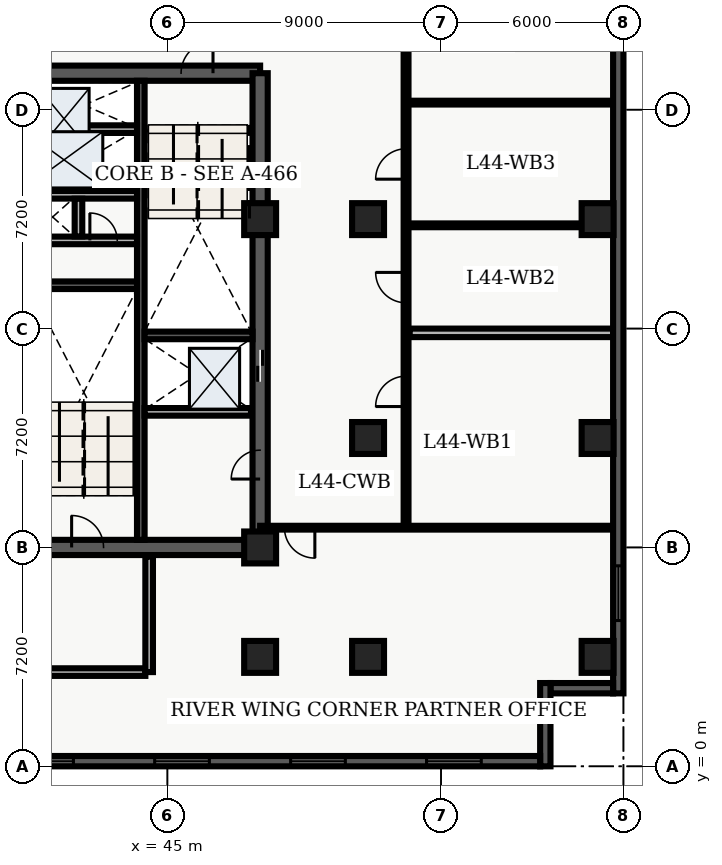
"""IFC4 building model, lengths in metres.
Left out: names, types, materials, properties, quantities, classifications, styles, units other than length and angle.
Written with IfcOpenShell. Run it as: python <this file> out.ifc"""

import sys

from ifc_helpers import new_model, entity, si_unit, converted_unit, direction, frame, origin_with_axes, origin_2d_with_axis, place, context, subcontext, project, spatial, polyline, rectangle, outline, extrude, element, fill, save


model = new_model("IFC4")
c1 = context("Model", 3, precision=1e-05, world=origin_with_axes(), true_north=direction((0.0, 1.0)))
c2 = subcontext(c1, "Body", "Model", "MODEL_VIEW")
j1 = project(units=[si_unit("LENGTHUNIT", "METRE"), converted_unit("PLANEANGLEUNIT", "DEGREE", entity("IfcPlaneAngleMeasure", 0.017), si_unit("PLANEANGLEUNIT", "RADIAN"), dimensions=[0, 0, 0, 0, 0, 0, 0])], contexts=[c1])
p1 = place(None, origin_with_axes())
s1 = spatial("IfcSite", under=j1, at=p1, CompositionType="ELEMENT")
p2 = place(p1, origin_with_axes())
s2 = spatial("IfcBuilding", under=s1, at=p2, CompositionType="ELEMENT")
p3 = place(p2, frame((0.0, 0.0, 179.7), z_axis=(0.0, 0.0, 1.0), x_axis=(1.0, 0.0, 0.0)))
s3 = spatial("IfcBuildingStorey", under=s2, at=p3, CompositionType="ELEMENT", Elevation=179.7)
p4 = place(p3, frame((40.2, 7.2, 0.0), z_axis=(0.0, 0.0, 1.0), x_axis=(1.0, 0.0, 0.0)))
e1 = element("IfcWall", 1, at=p4, inside=s3, PredefinedType="SHEAR", context=c2, shape_type="SweptSolid", body=[
    extrude(outline(polyline([(0.0, -0.25), (7.85, -0.25), (7.85, 0.25), (0.0, 0.25), (0.0, -0.25)])), origin_with_axes(), (0.0, 0.0, 1.0), 3.66),
])
p5 = place(p4, frame((2.175, 0.0, 0.0), z_axis=(0.0, 0.0, 1.0), x_axis=(1.0, 0.0, 0.0)))
e2 = element("IfcOpeningElement", 2, at=p5, cuts=e1, PredefinedType="OPENING", context=c2, shape_type="SweptSolid", body=[
    extrude(rectangle(XDim=1.05, YDim=0.52, at=origin_2d_with_axis()), origin_with_axes(), (0.0, 0.0, 1.0), 2.15),
])
p6 = place(p3, frame((40.2, 22.8, 0.0), z_axis=(0.0, 0.0, 1.0), x_axis=(1.0, 0.0, 0.0)))
e3 = element("IfcWall", 3, at=p6, inside=s3, PredefinedType="SHEAR", context=c2, shape_type="SweptSolid", body=[
    extrude(outline(polyline([(0.0, -0.25), (7.85, -0.25), (7.85, 0.25), (0.0, 0.25), (0.0, -0.25)])), origin_with_axes(), (0.0, 0.0, 1.0), 3.66),
])
p7 = place(p6, frame((5.775, 0.0, 0.0), z_axis=(0.0, 0.0, 1.0), x_axis=(1.0, 0.0, 0.0)))
e4 = element("IfcOpeningElement", 4, at=p7, cuts=e3, PredefinedType="OPENING", context=c2, shape_type="SweptSolid", body=[
    extrude(rectangle(XDim=1.05, YDim=0.52, at=origin_2d_with_axis()), origin_with_axes(), (0.0, 0.0, 1.0), 2.15),
])
p8 = place(p3, frame((48.05, 7.2, 0.0), z_axis=(0.0, 0.0, 1.0), x_axis=(0.0, 1.0, 0.0)))
e5 = element("IfcWall", 5, at=p8, inside=s3, PredefinedType="SHEAR", context=c2, shape_type="SweptSolid", body=[
    extrude(outline(polyline([(0.0, -0.25), (15.6, -0.25), (15.6, 0.25), (0.0, 0.25), (0.0, -0.25)])), origin_with_axes(), (0.0, 0.0, 1.0), 3.66),
])
p9 = place(p8, frame((5.975, 0.0, 0.0), z_axis=(0.0, 0.0, 1.0), x_axis=(1.0, 0.0, 0.0)))
e6 = element("IfcOpeningElement", 6, at=p9, cuts=e5, PredefinedType="OPENING", context=c2, shape_type="SweptSolid", body=[
    extrude(rectangle(XDim=1.05, YDim=0.52, at=origin_2d_with_axis()), origin_with_axes(), (0.0, 0.0, 1.0), 2.15),
])
p10 = place(p8, frame((2.725, 0.0, 0.0), z_axis=(0.0, 0.0, 1.0), x_axis=(1.0, 0.0, 0.0)))
e7 = element("IfcOpeningElement", 7, at=p10, cuts=e5, PredefinedType="OPENING", context=c2, shape_type="SweptSolid", body=[
    extrude(rectangle(XDim=0.95, YDim=0.52, at=origin_2d_with_axis()), origin_with_axes(), (0.0, 0.0, 1.0), 2.15),
])
p11 = place(p3, frame((44.125, 7.45, 0.0), z_axis=(0.0, 0.0, 1.0), x_axis=(0.0, 1.0, 0.0)))
e8 = element("IfcWall", 8, at=p11, inside=s3, PredefinedType="SHEAR", context=c2, shape_type="SweptSolid", body=[
    extrude(outline(polyline([(0.0, -0.125), (15.1, -0.125), (15.1, 0.125), (0.0, 0.125), (0.0, -0.125)])), origin_with_axes(), (0.0, 0.0, 1.0), 3.66),
])
for number, where, z_axis, x_axis in (
    (9, (40.45, 15.825, 0.0), (0.0, 0.0, 1.0), (1.0, 0.0, 0.0)),
    (10, (44.25, 14.175, 0.0), (0.0, 0.0, 1.0), (1.0, 0.0, 0.0)),
):
    element("IfcWall", number, at=place(p3, frame(where, z_axis=z_axis, x_axis=x_axis)), inside=s3, PredefinedType="SHEAR", context=c2, shape_type="SweptSolid", body=[
        extrude(outline(polyline([(0.0, -0.125), (3.55, -0.125), (3.55, 0.125), (0.0, 0.125), (0.0, -0.125)])), origin_with_axes(), (0.0, 0.0, 1.0), 3.66),
    ])
p12 = place(p3, frame((40.5, 17.3, 0.0), z_axis=(0.0, 0.0, 1.0), x_axis=(1.0, 0.0, 0.0)))
e11 = element("IfcWall", 11, at=p12, inside=s3, PredefinedType="SOLIDWALL", context=c2, shape_type="SweptSolid", body=[
    extrude(outline(polyline([(0.0, -0.125), (3.5, -0.125), (3.5, 0.125), (0.0, 0.125), (0.0, -0.125)])), origin_with_axes(), (0.0, 0.0, 1.0), 2.7),
])
p13 = place(p12, frame((2.4, 0.0, 0.0), z_axis=(0.0, 0.0, 1.0), x_axis=(1.0, 0.0, 0.0)))
e12 = element("IfcOpeningElement", 12, at=p13, cuts=e11, PredefinedType="OPENING", context=c2, shape_type="SweptSolid", body=[
    extrude(rectangle(XDim=0.9, YDim=0.27, at=origin_2d_with_axis()), origin_with_axes(), (0.0, 0.0, 1.0), 2.15),
])
p14 = place(p3, frame((40.5, 18.8, 0.0), z_axis=(0.0, 0.0, 1.0), x_axis=(1.0, 0.0, 0.0)))
e13 = element("IfcWall", 13, at=p14, inside=s3, PredefinedType="SOLIDWALL", context=c2, shape_type="SweptSolid", body=[
    extrude(outline(polyline([(0.0, -0.125), (3.5, -0.125), (3.5, 0.125), (0.0, 0.125), (0.0, -0.125)])), origin_with_axes(), (0.0, 0.0, 1.0), 2.7),
])
p15 = place(p3, frame((42.075, 17.43, 0.0), z_axis=(0.0, 0.0, 1.0), x_axis=(0.0, 1.0, 0.0)))
e14 = element("IfcWall", 14, at=p15, inside=s3, PredefinedType="SOLIDWALL", context=c2, shape_type="SweptSolid", body=[
    extrude(outline(polyline([(0.0, -0.125), (1.24, -0.125), (1.24, 0.125), (0.0, 0.125), (0.0, -0.125)])), origin_with_axes(), (0.0, 0.0, 1.0), 2.7),
])
p16 = place(p3, frame((40.325, 3.1, 0.0), z_axis=(0.0, 0.0, 1.0), x_axis=(1.0, 0.0, 0.0)))
e15 = element("IfcWall", 15, at=p16, inside=s3, PredefinedType="SOLIDWALL", context=c2, shape_type="SweptSolid", body=[
    extrude(outline(polyline([(0.0, -0.125), (3.95, -0.125), (3.95, 0.125), (0.0, 0.125), (0.0, -0.125)])), origin_with_axes(), (0.0, 0.0, 1.0), 2.7),
])
p17 = place(p3, frame((44.4, 3.1, 0.0), z_axis=(0.0, 0.0, 1.0), x_axis=(0.0, 1.0, 0.0)))
e16 = element("IfcWall", 16, at=p17, inside=s3, PredefinedType="SOLIDWALL", context=c2, shape_type="SweptSolid", body=[
    extrude(outline(polyline([(0.0, -0.125), (3.8, -0.125), (3.8, 0.125), (0.0, 0.125), (0.0, -0.125)])), origin_with_axes(), (0.0, 0.0, 1.0), 2.7),
])
for number, where, z_axis, x_axis in (
    (17, (48.05, 3.6, 0.0), (0.0, 0.0, 1.0), (1.0, 0.0, 0.0)),
    (18, (48.05, 7.2, 0.0), (0.0, 0.0, 1.0), (1.0, 0.0, 0.0)),
    (19, (48.05, 18.0, 0.0), (0.0, 0.0, 1.0), (1.0, 0.0, 0.0)),
    (20, (51.6, 3.6, 0.0), (0.0, 0.0, 1.0), (1.0, 0.0, 0.0)),
    (21, (51.6, 10.8, 0.0), (0.0, 0.0, 1.0), (1.0, 0.0, 0.0)),
    (22, (51.6, 18.0, 0.0), (0.0, 0.0, 1.0), (1.0, 0.0, 0.0)),
    (23, (59.15, 3.6, 0.0), (0.0, 0.0, 1.0), (1.0, 0.0, 0.0)),
    (24, (59.15, 10.8, 0.0), (0.0, 0.0, 1.0), (1.0, 0.0, 0.0)),
    (25, (59.15, 18.0, 0.0), (0.0, 0.0, 1.0), (1.0, 0.0, 0.0)),
):
    element("IfcColumn", number, at=place(p3, frame(where, z_axis=z_axis, x_axis=x_axis)), inside=s3, PredefinedType="COLUMN", context=c2, shape_type="SweptSolid", body=[
        extrude(rectangle(XDim=1.05, YDim=1.05, at=origin_2d_with_axis()), origin_with_axes(), (0.0, 0.0, 1.0), 3.9),
    ])
for number, where, z_axis, x_axis in (
    (26, (40.5, 20.96, 0.0), (0.0, 0.0, 1.0), (1.0, 0.0, 0.0)),
    (27, (44.25, 11.66, 0.0), (0.0, 0.0, 1.0), (1.0, 0.0, 0.0)),
):
    element("IfcWall", number, at=place(p3, frame(where, z_axis=z_axis, x_axis=x_axis)), inside=s3, PredefinedType="SOLIDWALL", context=c2, shape_type="SweptSolid", body=[
        extrude(outline(polyline([(0.0, -0.125), (3.5, -0.125), (3.5, 0.125), (0.0, 0.125), (0.0, -0.125)])), origin_with_axes(), (0.0, 0.0, 1.0), 2.7),
    ])
p18 = place(p3, frame((52.85, 7.85, 0.0), z_axis=(0.0, 0.0, 1.0), x_axis=(0.0, 1.0, 0.0)))
e28 = element("IfcWall", 28, at=p18, inside=s3, PredefinedType="PARTITIONING", context=c2, shape_type="SweptSolid", body=[
    extrude(outline(polyline([(0.0, -0.08), (18.8, -0.08), (18.8, 0.08), (0.0, 0.08), (0.0, -0.08)])), origin_with_axes(), (0.0, 0.0, 1.0), 2.7),
])
p19 = place(p18, frame((4.485, 0.0, 0.0), z_axis=(0.0, 0.0, 1.0), x_axis=(1.0, 0.0, 0.0)))
e29 = element("IfcOpeningElement", 29, at=p19, cuts=e28, PredefinedType="OPENING", context=c2, shape_type="SweptSolid", body=[
    extrude(rectangle(XDim=1.0, YDim=0.18, at=origin_2d_with_axis()), origin_with_axes(), (0.0, 0.0, 1.0), 2.15),
])
p20 = place(p18, frame((7.897, 0.0, 0.0), z_axis=(0.0, 0.0, 1.0), x_axis=(1.0, 0.0, 0.0)))
e30 = element("IfcOpeningElement", 30, at=p20, cuts=e28, PredefinedType="OPENING", context=c2, shape_type="SweptSolid", body=[
    extrude(rectangle(XDim=1.0, YDim=0.18, at=origin_2d_with_axis()), origin_with_axes(), (0.0, 0.0, 1.0), 2.15),
])
p21 = place(p18, frame((11.964, 0.0, 0.0), z_axis=(0.0, 0.0, 1.0), x_axis=(1.0, 0.0, 0.0)))
e31 = element("IfcOpeningElement", 31, at=p21, cuts=e28, PredefinedType="OPENING", context=c2, shape_type="SweptSolid", body=[
    extrude(rectangle(XDim=1.0, YDim=0.18, at=origin_2d_with_axis()), origin_with_axes(), (0.0, 0.0, 1.0), 2.15),
])
p22 = place(p18, frame((18.011, 0.0, 0.0), z_axis=(0.0, 0.0, 1.0), x_axis=(1.0, 0.0, 0.0)))
e32 = element("IfcOpeningElement", 32, at=p22, cuts=e28, PredefinedType="OPENING", context=c2, shape_type="SweptSolid", body=[
    extrude(rectangle(XDim=1.0, YDim=0.18, at=origin_2d_with_axis()), origin_with_axes(), (0.0, 0.0, 1.0), 2.15),
])
p23 = place(p3, frame((59.665, 7.85, 0.0), z_axis=(0.0, 0.0, 1.0), x_axis=(-1.0, 0.0, 0.0)))
e33 = element("IfcWall", 33, at=p23, inside=s3, PredefinedType="PARTITIONING", context=c2, shape_type="SweptSolid", body=[
    extrude(outline(polyline([(0.0, -0.062), (11.615, -0.062), (11.615, 0.062), (0.0, 0.062), (0.0, -0.062)])), origin_with_axes(), (0.0, 0.0, 1.0), 2.7),
])
p24 = place(p23, frame((10.315, 0.0, 0.0), z_axis=(0.0, 0.0, 1.0), x_axis=(1.0, 0.0, 0.0)))
e34 = element("IfcOpeningElement", 34, at=p24, cuts=e33, PredefinedType="OPENING", context=c2, shape_type="SweptSolid", body=[
    extrude(rectangle(XDim=1.0, YDim=0.145, at=origin_2d_with_axis()), origin_with_axes(), (0.0, 0.0, 1.0), 2.15),
])
p25 = place(p3, frame((52.97, 14.259, 0.0), z_axis=(0.0, 0.0, 1.0), x_axis=(1.0, 0.0, 0.0)))
e35 = element("IfcWall", 35, at=p25, inside=s3, PredefinedType="PARTITIONING", context=c2, shape_type="SweptSolid", body=[
    extrude(outline(polyline([(0.0, -0.14), (6.695, -0.14), (6.695, 0.14), (0.0, 0.14), (0.0, -0.14)])), origin_with_axes(), (0.0, 0.0, 1.0), 2.7),
])
for number, where, z_axis, x_axis in (
    (36, (52.97, 17.796, 0.0), (0.0, 0.0, 1.0), (1.0, 0.0, 0.0)),
    (37, (52.97, 21.832, 0.0), (0.0, 0.0, 1.0), (1.0, 0.0, 0.0)),
):
    element("IfcWall", number, at=place(p3, frame(where, z_axis=z_axis, x_axis=x_axis)), inside=s3, PredefinedType="PARTITIONING", context=c2, shape_type="SweptSolid", body=[
        extrude(outline(polyline([(0.0, -0.062), (6.695, -0.062), (6.695, 0.062), (0.0, 0.062), (0.0, -0.062)])), origin_with_axes(), (0.0, 0.0, 1.0), 2.7),
    ])
p26 = place(p3, frame((59.83, 26.06, 0.0), z_axis=(0.0, 0.0, 1.0), x_axis=(0.0, -1.0, 0.0)))
e38 = element("IfcWall", 38, at=p26, inside=s3, PredefinedType="SOLIDWALL", context=c2, shape_type="SweptSolid", body=[
    extrude(outline(polyline([(0.0, -0.17), (23.66, -0.17), (23.66, 0.17), (0.0, 0.17), (0.0, -0.17)])), origin_with_axes(), (0.0, 0.0, 1.0), 3.66),
])
p27 = place(p26, frame((20.364, 0.0, 0.45), z_axis=(0.0, 0.0, 1.0), x_axis=(1.0, 0.0, 0.0)))
e39 = element("IfcOpeningElement", 39, at=p27, cuts=e38, PredefinedType="OPENING", context=c2, shape_type="SweptSolid", body=[
    extrude(rectangle(XDim=1.8, YDim=0.36, at=origin_2d_with_axis()), origin_with_axes(), (0.0, 0.0, 1.0), 2.1),
])
p28 = place(p3, frame((59.66, 2.57, 0.0), z_axis=(0.0, 0.0, 1.0), x_axis=(-1.0, 0.0, 0.0)))
e40 = element("IfcWall", 40, at=p28, inside=s3, PredefinedType="SOLIDWALL", context=c2, shape_type="SweptSolid", body=[
    extrude(outline(polyline([(0.0, -0.17), (2.06, -0.17), (2.06, 0.17), (0.0, 0.17), (0.0, -0.17)])), origin_with_axes(), (0.0, 0.0, 1.0), 3.66),
])
p29 = place(p3, frame((57.43, 2.74, 0.0), z_axis=(0.0, 0.0, 1.0), x_axis=(0.0, -1.0, 0.0)))
e41 = element("IfcWall", 41, at=p29, inside=s3, PredefinedType="SOLIDWALL", context=c2, shape_type="SweptSolid", body=[
    extrude(outline(polyline([(0.0, -0.17), (2.74, -0.17), (2.74, 0.17), (0.0, 0.17), (0.0, -0.17)])), origin_with_axes(), (0.0, 0.0, 1.0), 3.66),
])
p30 = place(p3, frame((57.26, 0.17, 0.0), z_axis=(0.0, 0.0, 1.0), x_axis=(-1.0, 0.0, 0.0)))
e42 = element("IfcWall", 42, at=p30, inside=s3, PredefinedType="SOLIDWALL", context=c2, shape_type="SweptSolid", body=[
    extrude(outline(polyline([(0.0, -0.17), (54.86, -0.17), (54.86, 0.17), (0.0, 0.17), (0.0, -0.17)])), origin_with_axes(), (0.0, 0.0, 1.0), 3.66),
])
p31 = place(p30, frame((2.836, 0.0, 0.45), z_axis=(0.0, 0.0, 1.0), x_axis=(1.0, 0.0, 0.0)))
e43 = element("IfcOpeningElement", 43, at=p31, cuts=e42, PredefinedType="OPENING", context=c2, shape_type="SweptSolid", body=[
    extrude(rectangle(XDim=1.8, YDim=0.36, at=origin_2d_with_axis()), origin_with_axes(), (0.0, 0.0, 1.0), 2.1),
])
p32 = place(p30, frame((7.307, 0.0, 0.45), z_axis=(0.0, 0.0, 1.0), x_axis=(1.0, 0.0, 0.0)))
e44 = element("IfcOpeningElement", 44, at=p32, cuts=e42, PredefinedType="OPENING", context=c2, shape_type="SweptSolid", body=[
    extrude(rectangle(XDim=1.8, YDim=0.36, at=origin_2d_with_axis()), origin_with_axes(), (0.0, 0.0, 1.0), 2.1),
])
p33 = place(p30, frame((11.779, 0.0, 0.45), z_axis=(0.0, 0.0, 1.0), x_axis=(1.0, 0.0, 0.0)))
e45 = element("IfcOpeningElement", 45, at=p33, cuts=e42, PredefinedType="OPENING", context=c2, shape_type="SweptSolid", body=[
    extrude(rectangle(XDim=1.8, YDim=0.36, at=origin_2d_with_axis()), origin_with_axes(), (0.0, 0.0, 1.0), 2.1),
])
p34 = place(p30, frame((16.251, 0.0, 0.45), z_axis=(0.0, 0.0, 1.0), x_axis=(1.0, 0.0, 0.0)))
e46 = element("IfcOpeningElement", 46, at=p34, cuts=e42, PredefinedType="OPENING", context=c2, shape_type="SweptSolid", body=[
    extrude(rectangle(XDim=1.8, YDim=0.36, at=origin_2d_with_axis()), origin_with_axes(), (0.0, 0.0, 1.0), 2.1),
])
p35 = place(p30, frame((20.723, 0.0, 0.45), z_axis=(0.0, 0.0, 1.0), x_axis=(1.0, 0.0, 0.0)))
e47 = element("IfcOpeningElement", 47, at=p35, cuts=e42, PredefinedType="OPENING", context=c2, shape_type="SweptSolid", body=[
    extrude(rectangle(XDim=1.8, YDim=0.36, at=origin_2d_with_axis()), origin_with_axes(), (0.0, 0.0, 1.0), 2.1),
])
p36 = place(p30, frame((34.588, 0.0, 0.45), z_axis=(0.0, 0.0, 1.0), x_axis=(1.0, 0.0, 0.0)))
e48 = element("IfcOpeningElement", 48, at=p36, cuts=e42, PredefinedType="OPENING", context=c2, shape_type="SweptSolid", body=[
    extrude(rectangle(XDim=1.8, YDim=0.36, at=origin_2d_with_axis()), origin_with_axes(), (0.0, 0.0, 1.0), 2.1),
])
p37 = place(p30, frame((38.609, 0.0, 0.45), z_axis=(0.0, 0.0, 1.0), x_axis=(1.0, 0.0, 0.0)))
e49 = element("IfcOpeningElement", 49, at=p37, cuts=e42, PredefinedType="OPENING", context=c2, shape_type="SweptSolid", body=[
    extrude(rectangle(XDim=1.8, YDim=0.36, at=origin_2d_with_axis()), origin_with_axes(), (0.0, 0.0, 1.0), 2.1),
])
p38 = place(p30, frame((43.531, 0.0, 0.45), z_axis=(0.0, 0.0, 1.0), x_axis=(1.0, 0.0, 0.0)))
e50 = element("IfcOpeningElement", 50, at=p38, cuts=e42, PredefinedType="OPENING", context=c2, shape_type="SweptSolid", body=[
    extrude(rectangle(XDim=1.8, YDim=0.36, at=origin_2d_with_axis()), origin_with_axes(), (0.0, 0.0, 1.0), 2.1),
])
p39 = place(p30, frame((47.553, 0.0, 0.45), z_axis=(0.0, 0.0, 1.0), x_axis=(1.0, 0.0, 0.0)))
e51 = element("IfcOpeningElement", 51, at=p39, cuts=e42, PredefinedType="OPENING", context=c2, shape_type="SweptSolid", body=[
    extrude(rectangle(XDim=1.8, YDim=0.36, at=origin_2d_with_axis()), origin_with_axes(), (0.0, 0.0, 1.0), 2.1),
])
p40 = place(p30, frame((52.474, 0.0, 0.45), z_axis=(0.0, 0.0, 1.0), x_axis=(1.0, 0.0, 0.0)))
e52 = element("IfcOpeningElement", 52, at=p40, cuts=e42, PredefinedType="OPENING", context=c2, shape_type="SweptSolid", body=[
    extrude(rectangle(XDim=1.8, YDim=0.36, at=origin_2d_with_axis()), origin_with_axes(), (0.0, 0.0, 1.0), 2.1),
])
p41 = place(p8, frame((5.975, 0.0, 0.0), z_axis=(0.0, 0.0, 1.0), x_axis=(1.0, 0.0, 0.0)))
e53 = element("IfcDoor", 53, at=p41, inside=s3, OperationType="SLIDING_TO_LEFT", PredefinedType="DOOR", context=c2, shape_type="SweptSolid", body=[
    extrude(rectangle(XDim=1.05, YDim=0.09, at=origin_2d_with_axis()), origin_with_axes(), (0.0, 0.0, 1.0), 2.15),
])
fill(e6, e53)
p42 = place(p12, frame((2.4, 0.0, 0.0), z_axis=(0.0, 0.0, 1.0), x_axis=(1.0, 0.0, 0.0)))
e54 = element("IfcDoor", 54, at=p42, inside=s3, OperationType="SINGLE_SWING_LEFT", PredefinedType="DOOR", context=c2, shape_type="SweptSolid", body=[
    extrude(rectangle(XDim=0.9, YDim=0.09, at=origin_2d_with_axis()), origin_with_axes(), (0.0, 0.0, 1.0), 2.15),
])
fill(e12, e54)
p43 = place(p4, frame((2.175, 0.0, 0.0), z_axis=(0.0, 0.0, 1.0), x_axis=(1.0, 0.0, 0.0)))
e55 = element("IfcDoor", 55, at=p43, inside=s3, OperationType="SINGLE_SWING_LEFT", PredefinedType="DOOR", context=c2, shape_type="SweptSolid", body=[
    extrude(rectangle(XDim=1.05, YDim=0.09, at=origin_2d_with_axis()), origin_with_axes(), (0.0, 0.0, 1.0), 2.15),
])
fill(e2, e55)
p44 = place(p6, frame((5.775, 0.0, 0.0), z_axis=(0.0, 0.0, 1.0), x_axis=(1.0, 0.0, 0.0)))
e56 = element("IfcDoor", 56, at=p44, inside=s3, OperationType="SINGLE_SWING_RIGHT", PredefinedType="DOOR", context=c2, shape_type="SweptSolid", body=[
    extrude(rectangle(XDim=1.05, YDim=0.09, at=origin_2d_with_axis()), origin_with_axes(), (0.0, 0.0, 1.0), 2.15),
])
fill(e4, e56)
p45 = place(p8, frame((2.725, 0.0, 0.0), z_axis=(0.0, 0.0, 1.0), x_axis=(1.0, 0.0, 0.0)))
e57 = element("IfcDoor", 57, at=p45, inside=s3, OperationType="SINGLE_SWING_LEFT", PredefinedType="DOOR", context=c2, shape_type="SweptSolid", body=[
    extrude(rectangle(XDim=0.95, YDim=0.09, at=origin_2d_with_axis()), origin_with_axes(), (0.0, 0.0, 1.0), 2.15),
])
fill(e7, e57)
p46 = place(p23, frame((10.315, 0.0, 0.0), z_axis=(0.0, 0.0, 1.0), x_axis=(1.0, 0.0, 0.0)))
e58 = element("IfcDoor", 58, at=p46, inside=s3, OperationType="SINGLE_SWING_LEFT", PredefinedType="DOOR", context=c2, shape_type="SweptSolid", body=[
    extrude(rectangle(XDim=1.0, YDim=0.075, at=origin_2d_with_axis()), origin_with_axes(), (0.0, 0.0, 1.0), 2.15),
])
fill(e34, e58)
p47 = place(p18, frame((4.485, 0.0, 0.0), z_axis=(0.0, 0.0, 1.0), x_axis=(1.0, 0.0, 0.0)))
e59 = element("IfcDoor", 59, at=p47, inside=s3, OperationType="SINGLE_SWING_LEFT", PredefinedType="DOOR", context=c2, shape_type="SweptSolid", body=[
    extrude(rectangle(XDim=1.0, YDim=0.09, at=origin_2d_with_axis()), origin_with_axes(), (0.0, 0.0, 1.0), 2.15),
])
fill(e29, e59)
p48 = place(p18, frame((7.897, 0.0, 0.0), z_axis=(0.0, 0.0, 1.0), x_axis=(1.0, 0.0, 0.0)))
e60 = element("IfcDoor", 60, at=p48, inside=s3, OperationType="SINGLE_SWING_RIGHT", PredefinedType="DOOR", context=c2, shape_type="SweptSolid", body=[
    extrude(rectangle(XDim=1.0, YDim=0.09, at=origin_2d_with_axis()), origin_with_axes(), (0.0, 0.0, 1.0), 2.15),
])
fill(e30, e60)
p49 = place(p18, frame((11.964, 0.0, 0.0), z_axis=(0.0, 0.0, 1.0), x_axis=(1.0, 0.0, 0.0)))
e61 = element("IfcDoor", 61, at=p49, inside=s3, OperationType="SINGLE_SWING_LEFT", PredefinedType="DOOR", context=c2, shape_type="SweptSolid", body=[
    extrude(rectangle(XDim=1.0, YDim=0.09, at=origin_2d_with_axis()), origin_with_axes(), (0.0, 0.0, 1.0), 2.15),
])
fill(e31, e61)
p50 = place(p26, frame((20.364, 0.0, 0.45), z_axis=(0.0, 0.0, 1.0), x_axis=(1.0, 0.0, 0.0)))
e62 = element("IfcWindow", 62, at=p50, inside=s3, PredefinedType="WINDOW", context=c2, shape_type="SweptSolid", body=[
    extrude(rectangle(XDim=1.8, YDim=0.09, at=origin_2d_with_axis()), origin_with_axes(), (0.0, 0.0, 1.0), 2.1),
])
fill(e39, e62)
p51 = place(p30, frame((2.836, 0.0, 0.45), z_axis=(0.0, 0.0, 1.0), x_axis=(1.0, 0.0, 0.0)))
e63 = element("IfcWindow", 63, at=p51, inside=s3, PredefinedType="WINDOW", context=c2, shape_type="SweptSolid", body=[
    extrude(rectangle(XDim=1.8, YDim=0.09, at=origin_2d_with_axis()), origin_with_axes(), (0.0, 0.0, 1.0), 2.1),
])
fill(e43, e63)
p52 = place(p30, frame((7.307, 0.0, 0.45), z_axis=(0.0, 0.0, 1.0), x_axis=(1.0, 0.0, 0.0)))
e64 = element("IfcWindow", 64, at=p52, inside=s3, PredefinedType="WINDOW", context=c2, shape_type="SweptSolid", body=[
    extrude(rectangle(XDim=1.8, YDim=0.09, at=origin_2d_with_axis()), origin_with_axes(), (0.0, 0.0, 1.0), 2.1),
])
fill(e44, e64)
p53 = place(p30, frame((11.779, 0.0, 0.45), z_axis=(0.0, 0.0, 1.0), x_axis=(1.0, 0.0, 0.0)))
e65 = element("IfcWindow", 65, at=p53, inside=s3, PredefinedType="WINDOW", context=c2, shape_type="SweptSolid", body=[
    extrude(rectangle(XDim=1.8, YDim=0.09, at=origin_2d_with_axis()), origin_with_axes(), (0.0, 0.0, 1.0), 2.1),
])
fill(e45, e65)
p54 = place(p30, frame((16.251, 0.0, 0.45), z_axis=(0.0, 0.0, 1.0), x_axis=(1.0, 0.0, 0.0)))
e66 = element("IfcWindow", 66, at=p54, inside=s3, PredefinedType="WINDOW", context=c2, shape_type="SweptSolid", body=[
    extrude(rectangle(XDim=1.8, YDim=0.09, at=origin_2d_with_axis()), origin_with_axes(), (0.0, 0.0, 1.0), 2.1),
])
fill(e46, e66)
save(model, sys.argv[1])
